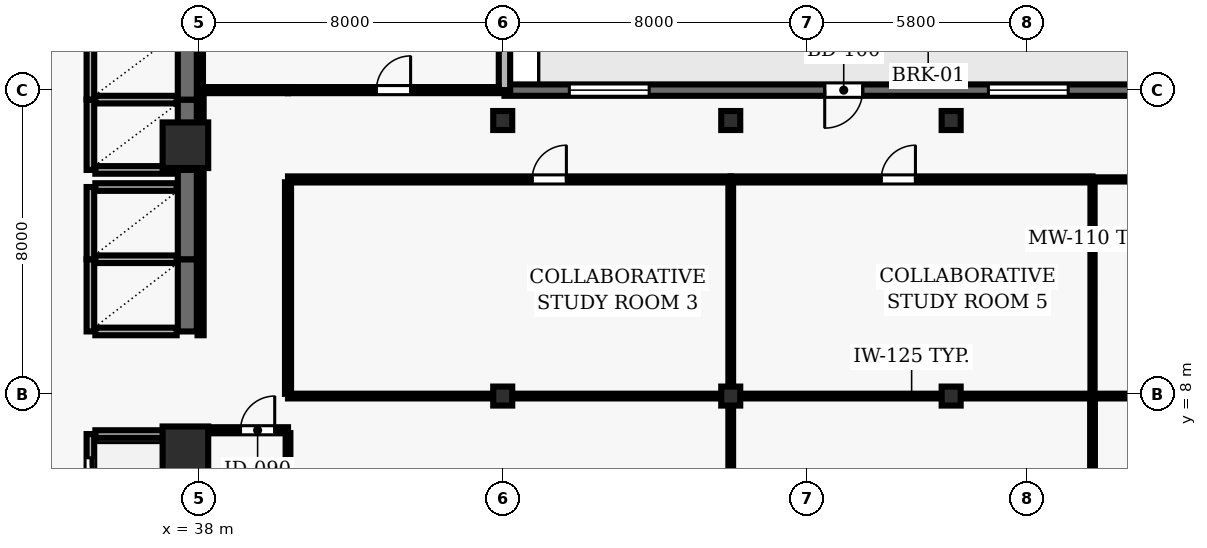
"""IFC4 building model, lengths in metres.
Left out: names, types, materials, properties, quantities, classifications, styles, units other than length and angle.
Written with IfcOpenShell. Run it as: python <this file> out.ifc"""

import sys

from ifc_helpers import new_model, si_unit, direction, frame, frame_2d, origin, origin_2d, place, context, subcontext, project, spatial, rectangle, hollow_rectangle, extrude, element, fill, save


model = new_model("IFC4")
c1 = context("Model", 3, precision=1e-05, world=origin(), true_north=direction((0.0, 1.0)))
c2 = subcontext(c1, "Body", "Model", "MODEL_VIEW")
j1 = project(units=[si_unit("LENGTHUNIT", "METRE"), si_unit("PLANEANGLEUNIT", "RADIAN")], contexts=[c1])
p1 = place(None, origin())
s1 = spatial("IfcSite", under=j1, at=p1, CompositionType="ELEMENT")
p2 = place(p1, origin())
s2 = spatial("IfcBuilding", under=s1, at=p2, CompositionType="ELEMENT")
p3 = place(p2, frame((0.0, 0.0, 146.3)))
s3 = spatial("IfcBuildingStorey", under=s2, at=p3, CompositionType="ELEMENT", Elevation=146.3)
for number, where, z_axis, x_axis in (
    (1, (37.65, 6.55, 0.0), (0.0, 0.0, 1.0), (1.0, 0.0, 0.0)),
    (2, (37.65, 14.55, 0.0), (0.0, 0.0, 1.0), (1.0, 0.0, 0.0)),
):
    element("IfcColumn", number, at=place(p3, frame(where, z_axis=z_axis, x_axis=x_axis)), inside=s3, PredefinedType="COLUMN", context=c2, shape_type="SweptSolid", body=[
        extrude(rectangle(XDim=1.2, YDim=1.2, at=origin_2d()), origin(), (0.0, 0.0, 1.0), 3.9),
    ])
for number, where, z_axis, x_axis in (
    (3, (46.0, 7.95, 0.0), (0.0, 0.0, 1.0), (1.0, 0.0, 0.0)),
    (4, (46.0, 15.2, 0.0), (0.0, 0.0, 1.0), (1.0, 0.0, 0.0)),
    (5, (52.0, 7.95, 0.0), (0.0, 0.0, 1.0), (1.0, 0.0, 0.0)),
    (6, (52.0, 15.2, 0.0), (0.0, 0.0, 1.0), (1.0, 0.0, 0.0)),
    (7, (57.8, 7.95, 0.0), (0.0, 0.0, 1.0), (1.0, 0.0, 0.0)),
    (8, (57.8, 15.2, 0.0), (0.0, 0.0, 1.0), (1.0, 0.0, 0.0)),
):
    element("IfcColumn", number, at=place(p3, frame(where, z_axis=z_axis, x_axis=x_axis)), inside=s3, PredefinedType="COLUMN", context=c2, shape_type="SweptSolid", body=[
        extrude(hollow_rectangle(XDim=0.5, YDim=0.5, WallThickness=0.025, at=origin_2d()), origin(), (0.0, 0.0, 1.0), 3.9),
    ])
p4 = place(p3, frame((68.1, 16.0, 0.0), z_axis=(0.0, 0.0, 1.0), x_axis=(-1.0, 0.0, 0.0)))
e9 = element("IfcWall", 9, at=p4, inside=s3, PredefinedType="SOLIDWALL", context=c2, shape_type="SweptSolid", body=[
    extrude(rectangle(XDim=22.054, YDim=0.3, at=frame_2d((11.027, 0.0))), origin(), (0.0, 0.0, 1.0), 3.69),
])
p5 = place(p4, frame((12.627, 0.0, 0.0)))
e10 = element("IfcOpeningElement", 10, at=p5, cuts=e9, PredefinedType="OPENING", context=c2, shape_type="SweptSolid", body=[
    extrude(rectangle(XDim=1.0, YDim=2.2, at=frame_2d((0.5, 1.1))), frame((0.0, 0.16, 0.0), z_axis=(0.0, -1.0, 0.0), x_axis=(1.0, 0.0, 0.0)), (0.0, 0.0, 1.0), 0.32),
])
p6 = place(p4, frame((1.707, 0.0, 0.9)))
e11 = element("IfcOpeningElement", 11, at=p6, cuts=e9, PredefinedType="OPENING", context=c2, shape_type="SweptSolid", body=[
    extrude(rectangle(XDim=2.1, YDim=1.6, at=frame_2d((1.05, 0.8))), frame((0.0, 0.16, 0.0), z_axis=(0.0, -1.0, 0.0), x_axis=(1.0, 0.0, 0.0)), (0.0, 0.0, 1.0), 0.32),
])
p7 = place(p4, frame((7.22, 0.0, 0.9)))
e12 = element("IfcOpeningElement", 12, at=p7, cuts=e9, PredefinedType="OPENING", context=c2, shape_type="SweptSolid", body=[
    extrude(rectangle(XDim=2.1, YDim=1.6, at=frame_2d((1.05, 0.8))), frame((0.0, 0.16, 0.0), z_axis=(0.0, -1.0, 0.0), x_axis=(1.0, 0.0, 0.0)), (0.0, 0.0, 1.0), 0.32),
])
p8 = place(p4, frame((18.247, 0.0, 0.9)))
e13 = element("IfcOpeningElement", 13, at=p8, cuts=e9, PredefinedType="OPENING", context=c2, shape_type="SweptSolid", body=[
    extrude(rectangle(XDim=2.1, YDim=1.6, at=frame_2d((1.05, 0.8))), frame((0.0, 0.16, 0.0), z_axis=(0.0, -1.0, 0.0), x_axis=(1.0, 0.0, 0.0)), (0.0, 0.0, 1.0), 0.32),
])
p9 = place(p3, frame((46.046, 16.0, 0.0), z_axis=(0.0, 0.0, 1.0), x_axis=(0.0, 1.0, 0.0)))
e14 = element("IfcWall", 14, at=p9, inside=s3, PredefinedType="SOLIDWALL", context=c2, shape_type="SweptSolid", body=[
    extrude(rectangle(XDim=7.8, YDim=0.3, at=frame_2d((3.9, 0.0))), origin(), (0.0, 0.0, 1.0), 3.69),
])
p10 = place(p9, frame((2.7, 0.0, 0.9)))
e15 = element("IfcOpeningElement", 15, at=p10, cuts=e14, PredefinedType="OPENING", context=c2, shape_type="SweptSolid", body=[
    extrude(rectangle(XDim=2.4, YDim=1.6, at=frame_2d((1.2, 0.8))), frame((0.0, 0.16, 0.0), z_axis=(0.0, -1.0, 0.0), x_axis=(1.0, 0.0, 0.0)), (0.0, 0.0, 1.0), 0.32),
])
p11 = place(p3, frame((35.15, 6.95, 0.0), z_axis=(0.0, 0.0, 1.0), x_axis=(0.0, -1.0, 0.0)))
e16 = element("IfcWall", 16, at=p11, inside=s3, PredefinedType="SOLIDWALL", context=c2, shape_type="SweptSolid", body=[
    extrude(rectangle(XDim=2.25, YDim=0.2, at=frame_2d((1.125, 0.0))), origin(), (0.0, 0.0, 1.0), 3.69),
])
p12 = place(p11, frame((0.625, 0.0, 0.0)))
e17 = element("IfcOpeningElement", 17, at=p12, cuts=e16, PredefinedType="OPENING", context=c2, shape_type="SweptSolid", body=[
    extrude(rectangle(XDim=1.0, YDim=2.1, at=frame_2d((0.5, 1.05))), frame((0.0, 0.11, 0.0), z_axis=(0.0, -1.0, 0.0), x_axis=(1.0, 0.0, 0.0)), (0.0, 0.0, 1.0), 0.22),
])
p13 = place(p3, frame((37.7, 4.7, 0.0), z_axis=(0.0, 0.0, 1.0), x_axis=(0.0, 1.0, 0.0)))
e18 = element("IfcWall", 18, at=p13, inside=s3, PredefinedType="SHEAR", context=c2, shape_type="SweptSolid", body=[
    extrude(rectangle(XDim=2.25, YDim=0.5, at=frame_2d((1.125, 0.0))), origin(), (0.0, 0.0, 1.0), 3.69),
])
p14 = place(p3, frame((37.42, 6.95, 0.0), z_axis=(0.0, 0.0, 1.0), x_axis=(-1.0, 0.0, 0.0)))
e19 = element("IfcWall", 19, at=p14, inside=s3, PredefinedType="SOLIDWALL", context=c2, shape_type="SweptSolid", body=[
    extrude(rectangle(XDim=2.14, YDim=0.2, at=frame_2d((1.07, 0.0))), origin(), (0.0, 0.0, 1.0), 3.69),
])
p15 = place(p3, frame((35.15, 11.55, 0.0), z_axis=(0.0, 0.0, 1.0), x_axis=(0.0, -1.0, 0.0)))
e20 = element("IfcWall", 20, at=p15, inside=s3, PredefinedType="SOLIDWALL", context=c2, shape_type="SweptSolid", body=[
    extrude(rectangle(XDim=1.9, YDim=0.2, at=frame_2d((0.95, 0.0))), origin(), (0.0, 0.0, 1.0), 3.69),
])
p16 = place(p3, frame((37.7, 9.65, 0.0), z_axis=(0.0, 0.0, 1.0), x_axis=(0.0, 1.0, 0.0)))
e21 = element("IfcWall", 21, at=p16, inside=s3, PredefinedType="SHEAR", context=c2, shape_type="SweptSolid", body=[
    extrude(rectangle(XDim=1.9, YDim=0.5, at=frame_2d((0.95, 0.0))), origin(), (0.0, 0.0, 1.0), 3.69),
])
for number, where, z_axis, x_axis in (
    (22, (35.28, 9.65, 0.0), (0.0, 0.0, 1.0), (1.0, 0.0, 0.0)),
    (23, (37.42, 11.55, 0.0), (0.0, 0.0, 1.0), (-1.0, 0.0, 0.0)),
):
    element("IfcWall", number, at=place(p3, frame(where, z_axis=z_axis, x_axis=x_axis)), inside=s3, PredefinedType="SOLIDWALL", context=c2, shape_type="SweptSolid", body=[
        extrude(rectangle(XDim=2.14, YDim=0.2, at=frame_2d((1.07, 0.0))), origin(), (0.0, 0.0, 1.0), 3.69),
    ])
p17 = place(p3, frame((35.15, 13.45, 0.0), z_axis=(0.0, 0.0, 1.0), x_axis=(0.0, -1.0, 0.0)))
e24 = element("IfcWall", 24, at=p17, inside=s3, PredefinedType="SOLIDWALL", context=c2, shape_type="SweptSolid", body=[
    extrude(rectangle(XDim=1.9, YDim=0.2, at=frame_2d((0.95, 0.0))), origin(), (0.0, 0.0, 1.0), 3.69),
])
p18 = place(p3, frame((37.7, 11.55, 0.0), z_axis=(0.0, 0.0, 1.0), x_axis=(0.0, 1.0, 0.0)))
e25 = element("IfcWall", 25, at=p18, inside=s3, PredefinedType="SHEAR", context=c2, shape_type="SweptSolid", body=[
    extrude(rectangle(XDim=2.35, YDim=0.5, at=frame_2d((1.175, 0.0))), origin(), (0.0, 0.0, 1.0), 3.69),
])
p19 = place(p3, frame((37.42, 13.45, 0.0), z_axis=(0.0, 0.0, 1.0), x_axis=(-1.0, 0.0, 0.0)))
e26 = element("IfcWall", 26, at=p19, inside=s3, PredefinedType="SOLIDWALL", context=c2, shape_type="SweptSolid", body=[
    extrude(rectangle(XDim=2.14, YDim=0.2, at=frame_2d((1.07, 0.0))), origin(), (0.0, 0.0, 1.0), 3.69),
])
p20 = place(p3, frame((35.15, 15.75, 0.0), z_axis=(0.0, 0.0, 1.0), x_axis=(0.0, -1.0, 0.0)))
e27 = element("IfcWall", 27, at=p20, inside=s3, PredefinedType="SOLIDWALL", context=c2, shape_type="SweptSolid", body=[
    extrude(rectangle(XDim=1.85, YDim=0.2, at=frame_2d((0.925, 0.0))), origin(), (0.0, 0.0, 1.0), 3.69),
])
p21 = place(p3, frame((37.7, 13.9, 0.0), z_axis=(0.0, 0.0, 1.0), x_axis=(0.0, 1.0, 0.0)))
e28 = element("IfcWall", 28, at=p21, inside=s3, PredefinedType="SHEAR", context=c2, shape_type="SweptSolid", body=[
    extrude(rectangle(XDim=1.85, YDim=0.5, at=frame_2d((0.925, 0.0))), origin(), (0.0, 0.0, 1.0), 3.69),
])
for number, where, z_axis, x_axis in (
    (29, (35.28, 13.9, 0.0), (0.0, 0.0, 1.0), (1.0, 0.0, 0.0)),
    (30, (37.42, 15.75, 0.0), (0.0, 0.0, 1.0), (-1.0, 0.0, 0.0)),
):
    element("IfcWall", number, at=place(p3, frame(where, z_axis=z_axis, x_axis=x_axis)), inside=s3, PredefinedType="SOLIDWALL", context=c2, shape_type="SweptSolid", body=[
        extrude(rectangle(XDim=2.14, YDim=0.2, at=frame_2d((1.07, 0.0))), origin(), (0.0, 0.0, 1.0), 3.69),
    ])
p22 = place(p3, frame((35.15, 17.6, 0.0), z_axis=(0.0, 0.0, 1.0), x_axis=(0.0, -1.0, 0.0)))
e31 = element("IfcWall", 31, at=p22, inside=s3, PredefinedType="SOLIDWALL", context=c2, shape_type="SweptSolid", body=[
    extrude(rectangle(XDim=1.85, YDim=0.2, at=frame_2d((0.925, 0.0))), origin(), (0.0, 0.0, 1.0), 3.69),
])
p23 = place(p3, frame((37.7, 15.75, 0.0), z_axis=(0.0, 0.0, 1.0), x_axis=(0.0, 1.0, 0.0)))
e32 = element("IfcWall", 32, at=p23, inside=s3, PredefinedType="SHEAR", context=c2, shape_type="SweptSolid", body=[
    extrude(rectangle(XDim=1.85, YDim=0.5, at=frame_2d((0.925, 0.0))), origin(), (0.0, 0.0, 1.0), 3.69),
])
p24 = place(p3, frame((38.05, 7.05, 0.0), z_axis=(0.0, 0.0, 1.0), x_axis=(1.0, 0.0, 0.0)))
e33 = element("IfcWall", 33, at=p24, inside=s3, PredefinedType="PARTITIONING", context=c2, shape_type="SweptSolid", body=[
    extrude(rectangle(XDim=2.3, YDim=0.16, at=frame_2d((1.15, 0.0))), origin(), (0.0, 0.0, 1.0), 3.69),
])
p25 = place(p24, frame((1.05, 0.0, 0.0)))
e34 = element("IfcOpeningElement", 34, at=p25, cuts=e33, PredefinedType="OPENING", context=c2, shape_type="SweptSolid", body=[
    extrude(rectangle(XDim=0.9, YDim=2.1, at=frame_2d((0.45, 1.05))), frame((0.0, 0.09, 0.0), z_axis=(0.0, -1.0, 0.0), x_axis=(1.0, 0.0, 0.0)), (0.0, 0.0, 1.0), 0.18),
])
p26 = place(p3, frame((40.35, 13.65, 0.0), z_axis=(0.0, 0.0, 1.0), x_axis=(1.0, 0.0, 0.0)))
e35 = element("IfcWall", 35, at=p26, inside=s3, PredefinedType="PARTITIONING", context=c2, shape_type="SweptSolid", body=[
    extrude(rectangle(XDim=11.65, YDim=0.16, at=frame_2d((5.825, 0.0))), origin(), (0.0, 0.0, 1.0), 3.69),
])
p27 = place(p26, frame((6.425, 0.0, 0.0)))
e36 = element("IfcOpeningElement", 36, at=p27, cuts=e35, PredefinedType="OPENING", context=c2, shape_type="SweptSolid", body=[
    extrude(rectangle(XDim=0.9, YDim=2.1, at=frame_2d((0.45, 1.05))), frame((0.0, 0.09, 0.0), z_axis=(0.0, -1.0, 0.0), x_axis=(1.0, 0.0, 0.0)), (0.0, 0.0, 1.0), 0.18),
])
p28 = place(p3, frame((40.35, 16.0, 0.0), z_axis=(0.0, 0.0, 1.0), x_axis=(-1.0, 0.0, 0.0)))
e37 = element("IfcWall", 37, at=p28, inside=s3, PredefinedType="PARTITIONING", context=c2, shape_type="SweptSolid", body=[
    extrude(rectangle(XDim=2.3, YDim=0.16, at=frame_2d((1.15, 0.0))), origin(), (0.0, 0.0, 1.0), 3.69),
])
p29 = place(p3, frame((40.35, 16.0, 0.0), z_axis=(0.0, 0.0, 1.0), x_axis=(1.0, 0.0, 0.0)))
e38 = element("IfcWall", 38, at=p29, inside=s3, PredefinedType="PARTITIONING", context=c2, shape_type="SweptSolid", body=[
    extrude(rectangle(XDim=5.551, YDim=0.16, at=frame_2d((2.775, 0.0))), origin(), (0.0, 0.0, 1.0), 3.69),
])
p30 = place(p29, frame((2.326, 0.0, 0.0)))
e39 = element("IfcOpeningElement", 39, at=p30, cuts=e38, PredefinedType="OPENING", context=c2, shape_type="SweptSolid", body=[
    extrude(rectangle(XDim=0.9, YDim=2.1, at=frame_2d((0.45, 1.05))), frame((0.0, 0.09, 0.0), z_axis=(0.0, -1.0, 0.0), x_axis=(1.0, 0.0, 0.0)), (0.0, 0.0, 1.0), 0.18),
])
p31 = place(p3, frame((52.0, 7.95, 0.0), z_axis=(0.0, 0.0, 1.0), x_axis=(-1.0, 0.0, 0.0)))
e40 = element("IfcWall", 40, at=p31, inside=s3, PredefinedType="PARTITIONING", context=c2, shape_type="SweptSolid", body=[
    extrude(rectangle(XDim=11.65, YDim=0.125, at=frame_2d((5.825, 0.0))), origin(), (0.0, 0.0, 1.0), 3.073),
])
p32 = place(p3, frame((52.0, 13.65, 0.0), z_axis=(0.0, 0.0, 1.0), x_axis=(1.0, 0.0, 0.0)))
e41 = element("IfcWall", 41, at=p32, inside=s3, PredefinedType="PARTITIONING", context=c2, shape_type="SweptSolid", body=[
    extrude(rectangle(XDim=9.52, YDim=0.16, at=frame_2d((4.76, 0.0))), origin(), (0.0, 0.0, 1.0), 3.69),
])
p33 = place(p32, frame((3.96, 0.0, 0.0)))
e42 = element("IfcOpeningElement", 42, at=p33, cuts=e41, PredefinedType="OPENING", context=c2, shape_type="SweptSolid", body=[
    extrude(rectangle(XDim=0.9, YDim=2.1, at=frame_2d((0.45, 1.05))), frame((0.0, 0.09, 0.0), z_axis=(0.0, -1.0, 0.0), x_axis=(1.0, 0.0, 0.0)), (0.0, 0.0, 1.0), 0.18),
])
p34 = place(p3, frame((61.52, 7.95, 0.0), z_axis=(0.0, 0.0, 1.0), x_axis=(-1.0, 0.0, 0.0)))
e43 = element("IfcWall", 43, at=p34, inside=s3, PredefinedType="PARTITIONING", context=c2, shape_type="SweptSolid", body=[
    extrude(rectangle(XDim=9.52, YDim=0.125, at=frame_2d((4.76, 0.0))), origin(), (0.0, 0.0, 1.0), 3.073),
])
p35 = place(p3, frame((61.52, 13.65, 0.0), z_axis=(0.0, 0.0, 1.0), x_axis=(1.0, 0.0, 0.0)))
e44 = element("IfcWall", 44, at=p35, inside=s3, PredefinedType="MOVABLE", context=c2, shape_type="SweptSolid", body=[
    extrude(rectangle(XDim=8.725, YDim=0.11, at=frame_2d((4.363, 0.0))), origin(), (0.0, 0.0, 1.0), 3.69),
])
p36 = place(p35, frame((3.913, 0.0, 0.0)))
e45 = element("IfcOpeningElement", 45, at=p36, cuts=e44, PredefinedType="OPENING", context=c2, shape_type="SweptSolid", body=[
    extrude(rectangle(XDim=0.9, YDim=2.1, at=frame_2d((0.45, 1.05))), frame((0.0, 0.065, 0.0), z_axis=(0.0, -1.0, 0.0), x_axis=(1.0, 0.0, 0.0)), (0.0, 0.0, 1.0), 0.13),
])
p37 = place(p3, frame((70.455, 7.95, 0.0), z_axis=(0.0, 0.0, 1.0), x_axis=(-1.0, 0.0, 0.0)))
e46 = element("IfcWall", 46, at=p37, inside=s3, PredefinedType="PARTITIONING", context=c2, shape_type="SweptSolid", body=[
    extrude(rectangle(XDim=8.935, YDim=0.125, at=frame_2d((4.468, 0.0))), origin(), (0.0, 0.0, 1.0), 3.69),
])
p38 = place(p3, frame((38.05, 6.975, 0.0), z_axis=(0.0, 0.0, 1.0), x_axis=(0.0, -1.0, 0.0)))
e47 = element("IfcWall", 47, at=p38, inside=s3, PredefinedType="PARTITIONING", context=c2, shape_type="SweptSolid", body=[
    extrude(rectangle(XDim=6.83, YDim=0.125, at=frame_2d((3.415, 0.0))), origin(), (0.0, 0.0, 1.0), 3.073),
])
p39 = place(p3, frame((38.05, 15.925, 0.0), z_axis=(0.0, 0.0, 1.0), x_axis=(0.0, -1.0, 0.0)))
e48 = element("IfcWall", 48, at=p39, inside=s3, PredefinedType="PARTITIONING", context=c2, shape_type="SweptSolid", body=[
    extrude(rectangle(XDim=6.375, YDim=0.16, at=frame_2d((3.188, 0.0))), origin(), (0.0, 0.0, 1.0), 3.073),
])
p40 = place(p3, frame((38.05, 23.861, 0.0), z_axis=(0.0, 0.0, 1.0), x_axis=(0.0, -1.0, 0.0)))
e49 = element("IfcWall", 49, at=p40, inside=s3, PredefinedType="PARTITIONING", context=c2, shape_type="SweptSolid", body=[
    extrude(rectangle(XDim=7.786, YDim=0.125, at=frame_2d((3.893, 0.0))), origin(), (0.0, 0.0, 1.0), 3.073),
])
p41 = place(p3, frame((40.35, 0.145, 0.0), z_axis=(0.0, 0.0, 1.0), x_axis=(0.0, 1.0, 0.0)))
e50 = element("IfcWall", 50, at=p41, inside=s3, PredefinedType="PARTITIONING", context=c2, shape_type="SweptSolid", body=[
    extrude(rectangle(XDim=6.83, YDim=0.125, at=frame_2d((3.415, 0.0))), origin(), (0.0, 0.0, 1.0), 3.69),
])
p42 = place(p41, frame((2.965, 0.0, 0.0)))
e51 = element("IfcOpeningElement", 51, at=p42, cuts=e50, PredefinedType="OPENING", context=c2, shape_type="SweptSolid", body=[
    extrude(rectangle(XDim=0.9, YDim=2.1, at=frame_2d((0.45, 1.05))), frame((0.0, 0.073, 0.0), z_axis=(0.0, -1.0, 0.0), x_axis=(1.0, 0.0, 0.0)), (0.0, 0.0, 1.0), 0.145),
])
p43 = place(p3, frame((40.35, 8.008, 0.0), z_axis=(0.0, 0.0, 1.0), x_axis=(0.0, 1.0, 0.0)))
e52 = element("IfcWall", 52, at=p43, inside=s3, PredefinedType="PARTITIONING", context=c2, shape_type="SweptSolid", body=[
    extrude(rectangle(XDim=5.567, YDim=0.16, at=frame_2d((2.783, 0.0))), origin(), (0.0, 0.0, 1.0), 3.69),
])
p44 = place(p3, frame((52.0, 0.145, 0.0), z_axis=(0.0, 0.0, 1.0), x_axis=(0.0, 1.0, 0.0)))
e53 = element("IfcWall", 53, at=p44, inside=s3, PredefinedType="PARTITIONING", context=c2, shape_type="SweptSolid", body=[
    extrude(rectangle(XDim=7.748, YDim=0.125, at=frame_2d((3.874, 0.0))), origin(), (0.0, 0.0, 1.0), 3.073),
])
p45 = place(p44, frame((3.424, 0.0, 0.0)))
e54 = element("IfcOpeningElement", 54, at=p45, cuts=e53, PredefinedType="OPENING", context=c2, shape_type="SweptSolid", body=[
    extrude(rectangle(XDim=0.9, YDim=2.1, at=frame_2d((0.45, 1.05))), frame((0.0, 0.073, 0.0), z_axis=(0.0, -1.0, 0.0), x_axis=(1.0, 0.0, 0.0)), (0.0, 0.0, 1.0), 0.145),
])
p46 = place(p3, frame((52.0, 8.008, 0.0), z_axis=(0.0, 0.0, 1.0), x_axis=(0.0, 1.0, 0.0)))
e55 = element("IfcWall", 55, at=p46, inside=s3, PredefinedType="PARTITIONING", context=c2, shape_type="SweptSolid", body=[
    extrude(rectangle(XDim=5.567, YDim=0.125, at=frame_2d((2.783, 0.0))), origin(), (0.0, 0.0, 1.0), 3.073),
])
p47 = place(p3, frame((61.52, 0.145, 0.0), z_axis=(0.0, 0.0, 1.0), x_axis=(0.0, 1.0, 0.0)))
e56 = element("IfcWall", 56, at=p47, inside=s3, PredefinedType="PARTITIONING", context=c2, shape_type="SweptSolid", body=[
    extrude(rectangle(XDim=7.748, YDim=0.125, at=frame_2d((3.874, 0.0))), origin(), (0.0, 0.0, 1.0), 3.69),
])
p48 = place(p47, frame((3.374, 0.0, 0.0)))
e57 = element("IfcOpeningElement", 57, at=p48, cuts=e56, PredefinedType="OPENING", context=c2, shape_type="SweptSolid", body=[
    extrude(rectangle(XDim=1.0, YDim=2.1, at=frame_2d((0.5, 1.05))), frame((0.0, 0.073, 0.0), z_axis=(0.0, -1.0, 0.0), x_axis=(1.0, 0.0, 0.0)), (0.0, 0.0, 1.0), 0.145),
])
p49 = place(p3, frame((61.52, 8.008, 0.0), z_axis=(0.0, 0.0, 1.0), x_axis=(0.0, 1.0, 0.0)))
e58 = element("IfcWall", 58, at=p49, inside=s3, PredefinedType="MOVABLE", context=c2, shape_type="SweptSolid", body=[
    extrude(rectangle(XDim=5.567, YDim=0.11, at=frame_2d((2.783, 0.0))), origin(), (0.0, 0.0, 1.0), 3.69),
])
p50 = place(p5, origin())
e59 = element("IfcDoor", 59, at=p50, inside=s3, OperationType="SINGLE_SWING_RIGHT", PredefinedType="DOOR", context=c2, shape_type="SweptSolid", body=[
    extrude(rectangle(XDim=1.0, YDim=2.2, at=frame_2d((0.5, 1.1))), frame((0.0, 0.025, 0.0), z_axis=(0.0, -1.0, 0.0), x_axis=(1.0, 0.0, 0.0)), (0.0, 0.0, 1.0), 0.05),
])
fill(e10, e59)
p51 = place(p7, origin())
e60 = element("IfcWindow", 60, at=p51, inside=s3, PartitioningType="SINGLE_PANEL", PredefinedType="WINDOW", context=c2, shape_type="SweptSolid", body=[
    extrude(rectangle(XDim=2.1, YDim=1.6, at=frame_2d((1.05, 0.8))), frame((0.0, 0.03, 0.0), z_axis=(0.0, -1.0, 0.0), x_axis=(1.0, 0.0, 0.0)), (0.0, 0.0, 1.0), 0.06),
])
fill(e12, e60)
p52 = place(p8, origin())
e61 = element("IfcWindow", 61, at=p52, inside=s3, PartitioningType="SINGLE_PANEL", PredefinedType="WINDOW", context=c2, shape_type="SweptSolid", body=[
    extrude(rectangle(XDim=2.1, YDim=1.6, at=frame_2d((1.05, 0.8))), frame((0.0, 0.03, 0.0), z_axis=(0.0, -1.0, 0.0), x_axis=(1.0, 0.0, 0.0)), (0.0, 0.0, 1.0), 0.06),
])
fill(e13, e61)
p53 = place(p12, origin())
e62 = element("IfcDoor", 62, at=p53, inside=s3, OperationType="DOUBLE_DOOR_SLIDING", PredefinedType="DOOR", context=c2, shape_type="SweptSolid", body=[
    extrude(rectangle(XDim=1.0, YDim=2.1, at=frame_2d((0.5, 1.05))), frame((0.0, 0.025, 0.0), z_axis=(0.0, -1.0, 0.0), x_axis=(1.0, 0.0, 0.0)), (0.0, 0.0, 1.0), 0.05),
])
fill(e17, e62)
p54 = place(p25, origin())
e63 = element("IfcDoor", 63, at=p54, inside=s3, OperationType="SINGLE_SWING_RIGHT", PredefinedType="DOOR", context=c2, shape_type="SweptSolid", body=[
    extrude(rectangle(XDim=0.9, YDim=2.1, at=frame_2d((0.45, 1.05))), frame((0.0, 0.025, 0.0), z_axis=(0.0, -1.0, 0.0), x_axis=(1.0, 0.0, 0.0)), (0.0, 0.0, 1.0), 0.05),
])
fill(e34, e63)
p55 = place(p27, origin())
e64 = element("IfcDoor", 64, at=p55, inside=s3, OperationType="SINGLE_SWING_RIGHT", PredefinedType="DOOR", context=c2, shape_type="SweptSolid", body=[
    extrude(rectangle(XDim=0.9, YDim=2.1, at=frame_2d((0.45, 1.05))), frame((0.0, 0.025, 0.0), z_axis=(0.0, -1.0, 0.0), x_axis=(1.0, 0.0, 0.0)), (0.0, 0.0, 1.0), 0.05),
])
fill(e36, e64)
p56 = place(p33, origin())
e65 = element("IfcDoor", 65, at=p56, inside=s3, OperationType="SINGLE_SWING_RIGHT", PredefinedType="DOOR", context=c2, shape_type="SweptSolid", body=[
    extrude(rectangle(XDim=0.9, YDim=2.1, at=frame_2d((0.45, 1.05))), frame((0.0, 0.025, 0.0), z_axis=(0.0, -1.0, 0.0), x_axis=(1.0, 0.0, 0.0)), (0.0, 0.0, 1.0), 0.05),
])
fill(e42, e65)
p57 = place(p30, origin())
e66 = element("IfcDoor", 66, at=p57, inside=s3, OperationType="SINGLE_SWING_RIGHT", PredefinedType="DOOR", context=c2, shape_type="SweptSolid", body=[
    extrude(rectangle(XDim=0.9, YDim=2.1, at=frame_2d((0.45, 1.05))), frame((0.0, 0.025, 0.0), z_axis=(0.0, -1.0, 0.0), x_axis=(1.0, 0.0, 0.0)), (0.0, 0.0, 1.0), 0.05),
])
fill(e39, e66)
save(model, sys.argv[1])
